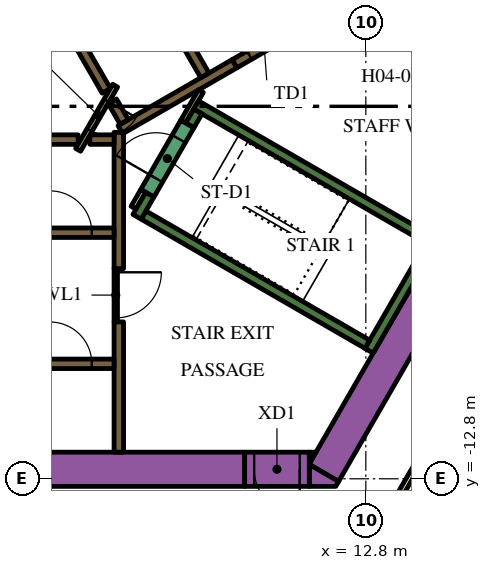
"""IFC4 building model, lengths in metres.
Left out: names, types, materials, properties, quantities, classifications, styles, units other than length and angle.
Written with IfcOpenShell. Run it as: python <this file> out.ifc"""

import sys

from ifc_helpers import new_model, si_unit, direction, frame, frame_2d, origin, place, context, subcontext, project, spatial, polyline, rectangle, outline, extrude, element, fill, save


model = new_model("IFC4")
c1 = context("Model", 3, precision=1e-05, world=origin(), true_north=direction((0.0, 1.0)))
c2 = subcontext(c1, "Body", "Model", "MODEL_VIEW")
j1 = project(units=[si_unit("LENGTHUNIT", "METRE"), si_unit("PLANEANGLEUNIT", "RADIAN")], contexts=[c1])
p1 = place(None, origin())
s1 = spatial("IfcSite", under=j1, at=p1, CompositionType="ELEMENT")
p2 = place(p1, origin())
s2 = spatial("IfcBuilding", under=s1, at=p2, CompositionType="ELEMENT")
p3 = place(p2, frame((0.0, 0.0, 70.5)))
s3 = spatial("IfcBuildingStorey", under=s2, at=p3, CompositionType="ELEMENT", Elevation=70.5)
p4 = place(p3, frame((6.461, 13.909, 0.0), z_axis=(0.0, 0.0, 1.0), x_axis=(0.500005804227, -0.866022052686, 0.0)))
e1 = element("IfcWall", 1, at=p4, inside=s3, PredefinedType="SOLIDWALL", context=c2, shape_type="SweptSolid", body=[
    extrude(rectangle(XDim=20.834, YDim=0.9, at=frame_2d((10.417, 0.0))), origin(), (0.0, 0.0, 1.0), 3.9),
])
p5 = place(p3, frame((11.695, -12.644, 0.0), z_axis=(0.0, 0.0, 1.0), x_axis=(0.500010229568, 0.86601949766, 0.0)))
e2 = element("IfcWall", 2, at=p5, inside=s3, PredefinedType="SOLIDWALL", context=c2, shape_type="SweptSolid", body=[
    extrude(rectangle(XDim=9.326, YDim=0.9, at=frame_2d((4.663, 0.0))), origin(), (0.0, 0.0, 1.0), 3.9),
])
p6 = place(p3, origin())
e3 = element("IfcWall", 3, at=p6, inside=s3, PredefinedType="SOLIDWALL", context=c2, shape_type="SweptSolid", body=[
    extrude(outline(polyline([(12.009, -13.0), (11.312, -13.0), (11.312, -12.425), (12.083, -12.871), (12.009, -13.0)])), origin(), (0.0, 0.0, 1.0), 3.9),
])
e4 = element("IfcWall", 4, at=p6, inside=s3, PredefinedType="SOLIDWALL", context=c2, shape_type="SweptSolid", body=[
    extrude(outline(polyline([(11.489, -12.1), (11.312, -12.407), (11.312, -12.1), (11.489, -12.1)])), origin(), (0.0, 0.0, 1.0), 3.9),
])
p7 = place(p3, frame((-12.019, -12.55, 0.0), z_axis=(0.0, 0.0, 1.0), x_axis=(1.0, 0.0, 0.0)))
e5 = element("IfcWall", 5, at=p7, inside=s3, PredefinedType="SOLIDWALL", context=c2, shape_type="SweptSolid", body=[
    extrude(rectangle(XDim=21.63, YDim=0.9, at=frame_2d((10.815, 0.0))), origin(), (0.0, 0.0, 1.0), 3.9),
])
p8 = place(p3, frame((12.885, -9.431, 0.0), z_axis=(0.0, 0.0, 1.0), x_axis=(0.500020560727, 0.866013532718, 0.0)))
e6 = element("IfcWall", 6, at=p8, inside=s3, PredefinedType="SOLIDWALL", context=c2, shape_type="SweptSolid", body=[
    extrude(rectangle(XDim=3.45, YDim=0.25, at=frame_2d((1.725, 0.0))), origin(), (0.0, 0.0, 1.0), 3.9),
])
p9 = place(p3, frame((12.84, -9.261, 0.0), z_axis=(0.0, 0.0, 1.0), x_axis=(-0.866013990052, 0.500019768644, 0.0)))
e7 = element("IfcWall", 7, at=p9, inside=s3, PredefinedType="SOLIDWALL", context=c2, shape_type="SweptSolid", body=[
    extrude(rectangle(XDim=6.8, YDim=0.25, at=frame_2d((3.4, 0.0))), origin(), (0.0, 0.0, 1.0), 3.9),
])
p10 = place(p3, frame((6.78, -5.906, 0.0), z_axis=(0.0, 0.0, 1.0), x_axis=(0.500223362819, 0.865896406789, 0.0)))
e8 = element("IfcWall", 8, at=p10, inside=s3, PredefinedType="SOLIDWALL", context=c2, shape_type="SweptSolid", body=[
    extrude(rectangle(XDim=0.675, YDim=0.25, at=frame_2d((0.337, 0.0))), origin(), (0.0, 0.0, 1.0), 3.9),
])
p11 = place(p3, frame((8.334, -2.964, 0.0), z_axis=(0.0, 0.0, 1.0), x_axis=(0.866016039709, -0.500016218704, 0.0)))
e9 = element("IfcWall", 9, at=p11, inside=s3, PredefinedType="SOLIDWALL", context=c2, shape_type="SweptSolid", body=[
    extrude(rectangle(XDim=7.05, YDim=0.25, at=frame_2d((3.525, 0.0))), origin(), (0.0, 0.0, 1.0), 3.9),
])
p12 = place(p3, frame((8.168, -3.503, 0.0), z_axis=(0.0, 0.0, 1.0), x_axis=(0.49972245349, 0.866185586049, 0.0)))
e10 = element("IfcWall", 10, at=p12, inside=s3, PredefinedType="SOLIDWALL", context=c2, shape_type="SweptSolid", body=[
    extrude(rectangle(XDim=0.425, YDim=0.25, at=frame_2d((0.212, 0.0))), origin(), (0.0, 0.0, 1.0), 3.9),
])
p13 = place(p3, frame((-5.259, -3.875, 0.0), z_axis=(0.0, 0.0, 1.0), x_axis=(1.0, 0.0, 0.0)))
e11 = element("IfcWall", 11, at=p13, inside=s3, PredefinedType="SOLIDWALL", context=c2, shape_type="SweptSolid", body=[
    extrude(rectangle(XDim=10.489, YDim=0.25, at=frame_2d((5.244, 0.0))), origin(), (0.0, 0.0, 1.0), 3.9),
])
p14 = place(p3, frame((6.3, -7.27, 0.0), z_axis=(0.0, 0.0, 1.0), x_axis=(0.0, 1.0, 0.0)))
e12 = element("IfcWall", 12, at=p14, inside=s3, PredefinedType="SOLIDWALL", context=c2, shape_type="SweptSolid", body=[
    extrude(rectangle(XDim=3.586, YDim=0.25, at=frame_2d((1.793, 0.0))), origin(), (0.0, 0.0, 1.0), 3.9),
])
p15 = place(p3, frame((6.3, -12.1, 0.0), z_axis=(0.0, 0.0, 1.0), x_axis=(0.0, 1.0, 0.0)))
e13 = element("IfcWall", 13, at=p15, inside=s3, PredefinedType="SOLIDWALL", context=c2, shape_type="SweptSolid", body=[
    extrude(rectangle(XDim=3.428, YDim=0.25, at=frame_2d((1.714, 0.0))), origin(), (0.0, 0.0, 1.0), 3.9),
])
p16 = place(p3, frame((5.538, -3.875, 0.0), z_axis=(0.0, 0.0, 1.0), x_axis=(1.0, 0.0, 0.0)))
e14 = element("IfcWall", 14, at=p16, inside=s3, PredefinedType="SOLIDWALL", context=c2, shape_type="SweptSolid", body=[
    extrude(rectangle(XDim=0.637, YDim=0.25, at=frame_2d((0.318, 0.0))), origin(), (0.0, 0.0, 1.0), 3.9),
])
p17 = place(p3, frame((9.346, -1.879, 0.0), z_axis=(0.0, 0.0, 1.0), x_axis=(-0.866048528039, -0.499959945477, 0.0)))
e15 = element("IfcWall", 15, at=p17, inside=s3, PredefinedType="SOLIDWALL", context=c2, shape_type="SweptSolid", body=[
    extrude(rectangle(XDim=3.47, YDim=0.25, at=frame_2d((1.735, 0.0))), origin(), (0.0, 0.0, 1.0), 3.9),
])
p18 = place(p3, frame((6.13, -2.867, 0.0), z_axis=(0.0, 0.0, 1.0), x_axis=(0.500160776593, -0.865932559475, 0.0)))
e16 = element("IfcWall", 16, at=p18, inside=s3, PredefinedType="SOLIDWALL", context=c2, shape_type="SweptSolid", body=[
    extrude(rectangle(XDim=0.627, YDim=0.25, at=frame_2d((0.313, 0.0))), origin(), (0.0, 0.0, 1.0), 3.9),
])
p19 = place(p3, frame((5.97, -2.591, 0.0), z_axis=(0.0, 0.0, 1.0), x_axis=(-0.499994469932, 0.866028596547, 0.0)))
e17 = element("IfcWall", 17, at=p19, inside=s3, PredefinedType="SOLIDWALL", context=c2, shape_type="SweptSolid", body=[
    extrude(rectangle(XDim=10.488, YDim=0.25, at=frame_2d((5.244, 0.0))), origin(), (0.0, 0.0, 1.0), 3.9),
])
p20 = place(p3, frame((6.945, -5.222, 0.0), z_axis=(0.0, 0.0, 1.0), x_axis=(-0.499818422106, -0.866130212453, 0.0)))
e18 = element("IfcWall", 18, at=p20, inside=s3, PredefinedType="PARTITIONING", context=c2, shape_type="SweptSolid", body=[
    extrude(rectangle(XDim=0.514, YDim=0.15, at=frame_2d((0.257, 0.0))), origin(), (0.0, 0.0, 1.0), 2.75),
])
p21 = place(p3, frame((8.459, -2.599, 0.0), z_axis=(0.0, 0.0, 1.0), x_axis=(-0.500041054325, -0.866001699761, 0.0)))
e19 = element("IfcWall", 19, at=p21, inside=s3, PredefinedType="PARTITIONING", context=c2, shape_type="SweptSolid", body=[
    extrude(rectangle(XDim=0.929, YDim=0.15, at=frame_2d((0.464, 0.0))), origin(), (0.0, 0.0, 1.0), 3.9),
])
p22 = place(p3, frame((-6.175, -9.775, 0.0), z_axis=(0.0, 0.0, 1.0), x_axis=(1.0, 0.0, 0.0)))
e20 = element("IfcWall", 20, at=p22, inside=s3, PredefinedType="SOLIDWALL", context=c2, shape_type="SweptSolid", body=[
    extrude(rectangle(XDim=12.35, YDim=0.25, at=frame_2d((6.175, 0.0))), origin(), (0.0, 0.0, 1.0), 3.9),
])
p23 = place(p22, frame((0.585, 0.0, 0.0)))
e21 = element("IfcOpeningElement", 21, at=p23, cuts=e20, PredefinedType="OPENING", context=c2, shape_type="SweptSolid", body=[
    extrude(rectangle(XDim=1.1, YDim=2.1, at=frame_2d((0.55, 1.05))), frame((0.0, 0.135, 0.0), z_axis=(0.0, -1.0, 0.0), x_axis=(1.0, 0.0, 0.0)), (0.0, 0.0, 1.0), 0.27),
])
p24 = place(p22, frame((3.105, 0.0, 0.0)))
e22 = element("IfcOpeningElement", 22, at=p24, cuts=e20, PredefinedType="OPENING", context=c2, shape_type="SweptSolid", body=[
    extrude(rectangle(XDim=1.1, YDim=2.1, at=frame_2d((0.55, 1.05))), frame((0.0, 0.135, 0.0), z_axis=(0.0, -1.0, 0.0), x_axis=(1.0, 0.0, 0.0)), (0.0, 0.0, 1.0), 0.27),
])
p25 = place(p22, frame((5.625, 0.0, 0.0)))
e23 = element("IfcOpeningElement", 23, at=p25, cuts=e20, PredefinedType="OPENING", context=c2, shape_type="SweptSolid", body=[
    extrude(rectangle(XDim=1.1, YDim=2.1, at=frame_2d((0.55, 1.05))), frame((0.0, 0.135, 0.0), z_axis=(0.0, -1.0, 0.0), x_axis=(1.0, 0.0, 0.0)), (0.0, 0.0, 1.0), 0.27),
])
p26 = place(p22, frame((8.145, 0.0, 0.0)))
e24 = element("IfcOpeningElement", 24, at=p26, cuts=e20, PredefinedType="OPENING", context=c2, shape_type="SweptSolid", body=[
    extrude(rectangle(XDim=1.1, YDim=2.1, at=frame_2d((0.55, 1.05))), frame((0.0, 0.135, 0.0), z_axis=(0.0, -1.0, 0.0), x_axis=(1.0, 0.0, 0.0)), (0.0, 0.0, 1.0), 0.27),
])
p27 = place(p22, frame((10.665, 0.0, 0.0)))
e25 = element("IfcOpeningElement", 25, at=p27, cuts=e20, PredefinedType="OPENING", context=c2, shape_type="SweptSolid", body=[
    extrude(rectangle(XDim=1.1, YDim=2.1, at=frame_2d((0.55, 1.05))), frame((0.0, 0.135, 0.0), z_axis=(0.0, -1.0, 0.0), x_axis=(1.0, 0.0, 0.0)), (0.0, 0.0, 1.0), 0.27),
])
p28 = place(p3, frame((-6.175, -6.325, 0.0), z_axis=(0.0, 0.0, 1.0), x_axis=(1.0, 0.0, 0.0)))
e26 = element("IfcWall", 26, at=p28, inside=s3, PredefinedType="SOLIDWALL", context=c2, shape_type="SweptSolid", body=[
    extrude(rectangle(XDim=12.35, YDim=0.25, at=frame_2d((6.175, 0.0))), origin(), (0.0, 0.0, 1.0), 3.9),
])
p29 = place(p28, frame((3.205, 0.0, 0.0)))
e27 = element("IfcOpeningElement", 27, at=p29, cuts=e26, PredefinedType="OPENING", context=c2, shape_type="SweptSolid", body=[
    extrude(rectangle(XDim=0.9, YDim=2.1, at=frame_2d((0.45, 1.05))), frame((0.0, 0.135, 0.0), z_axis=(0.0, -1.0, 0.0), x_axis=(1.0, 0.0, 0.0)), (0.0, 0.0, 1.0), 0.27),
])
p30 = place(p28, frame((8.145, 0.0, 0.0)))
e28 = element("IfcOpeningElement", 28, at=p30, cuts=e26, PredefinedType="OPENING", context=c2, shape_type="SweptSolid", body=[
    extrude(rectangle(XDim=1.1, YDim=2.1, at=frame_2d((0.55, 1.05))), frame((0.0, 0.135, 0.0), z_axis=(0.0, -1.0, 0.0), x_axis=(1.0, 0.0, 0.0)), (0.0, 0.0, 1.0), 0.27),
])
p31 = place(p28, frame((10.665, 0.0, 0.0)))
e29 = element("IfcOpeningElement", 29, at=p31, cuts=e26, PredefinedType="OPENING", context=c2, shape_type="SweptSolid", body=[
    extrude(rectangle(XDim=1.1, YDim=2.1, at=frame_2d((0.55, 1.05))), frame((0.0, 0.135, 0.0), z_axis=(0.0, -1.0, 0.0), x_axis=(1.0, 0.0, 0.0)), (0.0, 0.0, 1.0), 0.27),
])
p32 = place(p3, frame((8.565, -2.185, 0.0), z_axis=(0.0, 0.0, 1.0), x_axis=(-0.499997954832, 0.866026584559, 0.0)))
e30 = element("IfcWall", 30, at=p32, inside=s3, PredefinedType="SOLIDWALL", context=c2, shape_type="SweptSolid", body=[
    extrude(rectangle(XDim=12.35, YDim=0.25, at=frame_2d((6.175, 0.0))), origin(), (0.0, 0.0, 1.0), 3.9),
])
p33 = place(p32, frame((5.725, 0.0, 0.0)))
e31 = element("IfcOpeningElement", 31, at=p33, cuts=e30, PredefinedType="OPENING", context=c2, shape_type="SweptSolid", body=[
    extrude(rectangle(XDim=0.9, YDim=2.1, at=frame_2d((0.45, 1.05))), frame((0.0, 0.135, 0.0), z_axis=(0.0, -1.0, 0.0), x_axis=(1.0, 0.0, 0.0)), (0.0, 0.0, 1.0), 0.27),
])
p34 = place(p3, frame((7.053, -5.284, 0.0), z_axis=(0.0, 0.0, 1.0), x_axis=(0.500078061341, 0.865980330357, 0.0)))
e32 = element("IfcWall", 32, at=p34, inside=s3, PredefinedType="SOLIDWALL", context=c2, shape_type="SweptSolid", body=[
    extrude(rectangle(XDim=2.1, YDim=0.4, at=frame_2d((1.05, 0.0))), origin(), (0.0, 0.0, 1.0), 3.9),
])
p35 = place(p34, frame((0.45, 0.0, 0.0)))
e33 = element("IfcOpeningElement", 33, at=p35, cuts=e32, PredefinedType="OPENING", context=c2, shape_type="SweptSolid", body=[
    extrude(rectangle(XDim=1.2, YDim=2.1, at=frame_2d((0.6, 1.05))), frame((0.0, 0.21, 0.0), z_axis=(0.0, -1.0, 0.0), x_axis=(1.0, 0.0, 0.0)), (0.0, 0.0, 1.0), 0.42),
])
p36 = place(p3, frame((9.346, -1.879, 0.0), z_axis=(0.0, 0.0, 1.0), x_axis=(0.866047807691, 0.499961193289, 0.0)))
e34 = element("IfcWall", 34, at=p36, inside=s3, PredefinedType="SOLIDWALL", context=c2, shape_type="SweptSolid", body=[
    extrude(rectangle(XDim=1.8, YDim=0.25, at=frame_2d((0.9, 0.0))), origin(), (0.0, 0.0, 1.0), 3.9),
])
p37 = place(p36, frame((0.45, 0.0, 0.0)))
e35 = element("IfcOpeningElement", 35, at=p37, cuts=e34, PredefinedType="OPENING", context=c2, shape_type="SweptSolid", body=[
    extrude(rectangle(XDim=0.9, YDim=2.1, at=frame_2d((0.45, 1.05))), frame((0.0, 0.135, 0.0), z_axis=(0.0, -1.0, 0.0), x_axis=(1.0, 0.0, 0.0)), (0.0, 0.0, 1.0), 0.27),
])
p38 = place(p3, frame((6.203, -2.456, 0.0), z_axis=(0.0, 0.0, 1.0), x_axis=(-0.500043961785, -0.866000020948, 0.0)))
e36 = element("IfcWall", 36, at=p38, inside=s3, PredefinedType="PARTITIONING", context=c2, shape_type="SweptSolid", body=[
    extrude(rectangle(XDim=1.95, YDim=0.15, at=frame_2d((0.975, 0.0))), origin(), (0.0, 0.0, 1.0), 3.9),
])
p39 = place(p38, frame((0.45, 0.0, 0.0)))
e37 = element("IfcOpeningElement", 37, at=p39, cuts=e36, PredefinedType="OPENING", context=c2, shape_type="SweptSolid", body=[
    extrude(rectangle(XDim=0.9, YDim=2.1, at=frame_2d((0.45, 1.05))), frame((0.0, 0.085, 0.0), z_axis=(0.0, -1.0, 0.0), x_axis=(1.0, 0.0, 0.0)), (0.0, 0.0, 1.0), 0.17),
])
p40 = place(p3, frame((6.22, -7.266, 0.0), z_axis=(0.0, 0.0, 1.0), x_axis=(0.0, -1.0, 0.0)))
e38 = element("IfcWall", 38, at=p40, inside=s3, PredefinedType="PARTITIONING", context=c2, shape_type="SweptSolid", body=[
    extrude(rectangle(XDim=1.4, YDim=0.09, at=frame_2d((0.7, 0.0))), origin(), (0.0, 0.0, 1.0), 2.75),
])
p41 = place(p40, frame((0.1, 0.0, 0.0)))
e39 = element("IfcOpeningElement", 39, at=p41, cuts=e38, PredefinedType="OPENING", context=c2, shape_type="SweptSolid", body=[
    extrude(rectangle(XDim=1.2, YDim=2.1, at=frame_2d((0.6, 1.05))), frame((0.0, 0.055, 0.0), z_axis=(0.0, -1.0, 0.0), x_axis=(1.0, 0.0, 0.0)), (0.0, 0.0, 1.0), 0.11),
])
p42 = place(p3, frame((11.312, -12.55, 0.0), z_axis=(0.0, 0.0, 1.0), x_axis=(-1.0, 0.0, 0.0)))
e40 = element("IfcWall", 40, at=p42, inside=s3, PredefinedType="SOLIDWALL", context=c2, shape_type="SweptSolid", body=[
    extrude(rectangle(XDim=1.7, YDim=0.9, at=frame_2d((0.85, 0.0))), origin(), (0.0, 0.0, 1.0), 3.9),
])
p43 = place(p42, frame((0.25, 0.0, 0.0)))
e41 = element("IfcOpeningElement", 41, at=p43, cuts=e40, PredefinedType="OPENING", context=c2, shape_type="SweptSolid", body=[
    extrude(rectangle(XDim=1.2, YDim=2.1, at=frame_2d((0.6, 1.05))), frame((0.0, 0.46, 0.0), z_axis=(0.0, -1.0, 0.0), x_axis=(1.0, 0.0, 0.0)), (0.0, 0.0, 1.0), 0.92),
])
p44 = place(p3, frame((6.163, 18.475, 0.0), z_axis=(0.0, 0.0, 1.0), x_axis=(0.500001317485, -0.866024643133, 0.0)))
e42 = element("IfcWall", 42, at=p44, inside=s3, PredefinedType="PARTITIONING", context=c2, shape_type="SweptSolid", body=[
    extrude(rectangle(XDim=25.767, YDim=0.15, at=frame_2d((12.883, 0.0))), origin(), (0.0, 0.0, 1.0), 2.75),
])
p45 = place(p44, frame((21.138, 0.0, 0.0)))
e43 = element("IfcOpeningElement", 43, at=p45, cuts=e42, PredefinedType="OPENING", context=c2, shape_type="SweptSolid", body=[
    extrude(rectangle(XDim=1.0, YDim=2.1, at=frame_2d((0.5, 1.05))), frame((0.0, 0.085, 0.0), z_axis=(0.0, -1.0, 0.0), x_axis=(1.0, 0.0, 0.0)), (0.0, 0.0, 1.0), 0.17),
])
p46 = place(p44, frame((9.948, 0.0, 0.0)))
e44 = element("IfcOpeningElement", 44, at=p46, cuts=e42, PredefinedType="OPENING", context=c2, shape_type="SweptSolid", body=[
    extrude(rectangle(XDim=1.1, YDim=2.1, at=frame_2d((0.55, 1.05))), frame((0.0, 0.085, 0.0), z_axis=(0.0, -1.0, 0.0), x_axis=(1.0, 0.0, 0.0)), (0.0, 0.0, 1.0), 0.17),
])
p47 = place(p44, frame((8.641, 0.0, 0.0)))
e45 = element("IfcOpeningElement", 45, at=p47, cuts=e42, PredefinedType="OPENING", context=c2, shape_type="SweptSolid", body=[
    extrude(rectangle(XDim=1.0, YDim=2.1, at=frame_2d((0.5, 1.05))), frame((0.0, 0.085, 0.0), z_axis=(0.0, -1.0, 0.0), x_axis=(1.0, 0.0, 0.0)), (0.0, 0.0, 1.0), 0.17),
])
p48 = place(p44, frame((0.18, 0.0, 0.0)))
e46 = element("IfcOpeningElement", 46, at=p48, cuts=e42, PredefinedType="OPENING", context=c2, shape_type="SweptSolid", body=[
    extrude(rectangle(XDim=1.0, YDim=2.1, at=frame_2d((0.5, 1.05))), frame((0.0, 0.085, 0.0), z_axis=(0.0, -1.0, 0.0), x_axis=(1.0, 0.0, 0.0)), (0.0, 0.0, 1.0), 0.17),
])
p49 = place(p3, frame((15.587, -9.952, 0.0), z_axis=(0.0, 0.0, 1.0), x_axis=(-0.500016618951, -0.866015808616, 0.0)))
e47 = element("IfcWall", 47, at=p49, inside=s3, PredefinedType="PARTITIONING", context=c2, shape_type="SweptSolid", body=[
    extrude(rectangle(XDim=5.268, YDim=0.15, at=frame_2d((2.634, 0.0))), origin(), (0.0, 0.0, 1.0), 2.75),
])
p50 = place(p27, origin())
e48 = element("IfcDoor", 48, at=p50, inside=s3, OperationType="DOUBLE_DOOR_SLIDING", PredefinedType="DOOR", context=c2, shape_type="SweptSolid", body=[
    extrude(rectangle(XDim=1.1, YDim=2.1, at=frame_2d((0.55, 1.05))), frame((0.0, 0.025, 0.0), z_axis=(0.0, -1.0, 0.0), x_axis=(1.0, 0.0, 0.0)), (0.0, 0.0, 1.0), 0.05),
])
fill(e25, e48)
p51 = place(p31, origin())
e49 = element("IfcDoor", 49, at=p51, inside=s3, OperationType="DOUBLE_DOOR_SLIDING", PredefinedType="DOOR", context=c2, shape_type="SweptSolid", body=[
    extrude(rectangle(XDim=1.1, YDim=2.1, at=frame_2d((0.55, 1.05))), frame((0.0, 0.025, 0.0), z_axis=(0.0, -1.0, 0.0), x_axis=(1.0, 0.0, 0.0)), (0.0, 0.0, 1.0), 0.05),
])
fill(e29, e49)
p52 = place(p35, origin())
e50 = element("IfcDoor", 50, at=p52, inside=s3, OperationType="SINGLE_SWING_LEFT", PredefinedType="DOOR", context=c2, shape_type="SweptSolid", body=[
    extrude(rectangle(XDim=1.2, YDim=2.1, at=frame_2d((0.6, 1.05))), frame((0.0, 0.025, 0.0), z_axis=(0.0, -1.0, 0.0), x_axis=(1.0, 0.0, 0.0)), (0.0, 0.0, 1.0), 0.05),
])
fill(e33, e50)
p53 = place(p37, origin())
e51 = element("IfcDoor", 51, at=p53, inside=s3, OperationType="SINGLE_SWING_LEFT", PredefinedType="DOOR", context=c2, shape_type="SweptSolid", body=[
    extrude(rectangle(XDim=0.9, YDim=2.1, at=frame_2d((0.45, 1.05))), frame((0.0, 0.025, 0.0), z_axis=(0.0, -1.0, 0.0), x_axis=(1.0, 0.0, 0.0)), (0.0, 0.0, 1.0), 0.05),
])
fill(e35, e51)
p54 = place(p39, origin())
e52 = element("IfcDoor", 52, at=p54, inside=s3, OperationType="SINGLE_SWING_LEFT", PredefinedType="DOOR", context=c2, shape_type="SweptSolid", body=[
    extrude(rectangle(XDim=0.9, YDim=2.1, at=frame_2d((0.45, 1.05))), frame((0.0, 0.025, 0.0), z_axis=(0.0, -1.0, 0.0), x_axis=(1.0, 0.0, 0.0)), (0.0, 0.0, 1.0), 0.05),
])
fill(e37, e52)
p55 = place(p41, origin())
e53 = element("IfcDoor", 53, at=p55, inside=s3, OperationType="SINGLE_SWING_LEFT", PredefinedType="DOOR", context=c2, shape_type="SweptSolid", body=[
    extrude(rectangle(XDim=1.2, YDim=2.1, at=frame_2d((0.6, 1.05))), frame((0.0, 0.025, 0.0), z_axis=(0.0, -1.0, 0.0), x_axis=(1.0, 0.0, 0.0)), (0.0, 0.0, 1.0), 0.05),
])
fill(e39, e53)
p56 = place(p43, origin())
e54 = element("IfcDoor", 54, at=p56, inside=s3, OperationType="SINGLE_SWING_LEFT", PredefinedType="DOOR", context=c2, shape_type="SweptSolid", body=[
    extrude(rectangle(XDim=1.2, YDim=2.1, at=frame_2d((0.6, 1.05))), frame((0.0, 0.025, 0.0), z_axis=(0.0, -1.0, 0.0), x_axis=(1.0, 0.0, 0.0)), (0.0, 0.0, 1.0), 0.05),
])
fill(e41, e54)
save(model, sys.argv[1])
